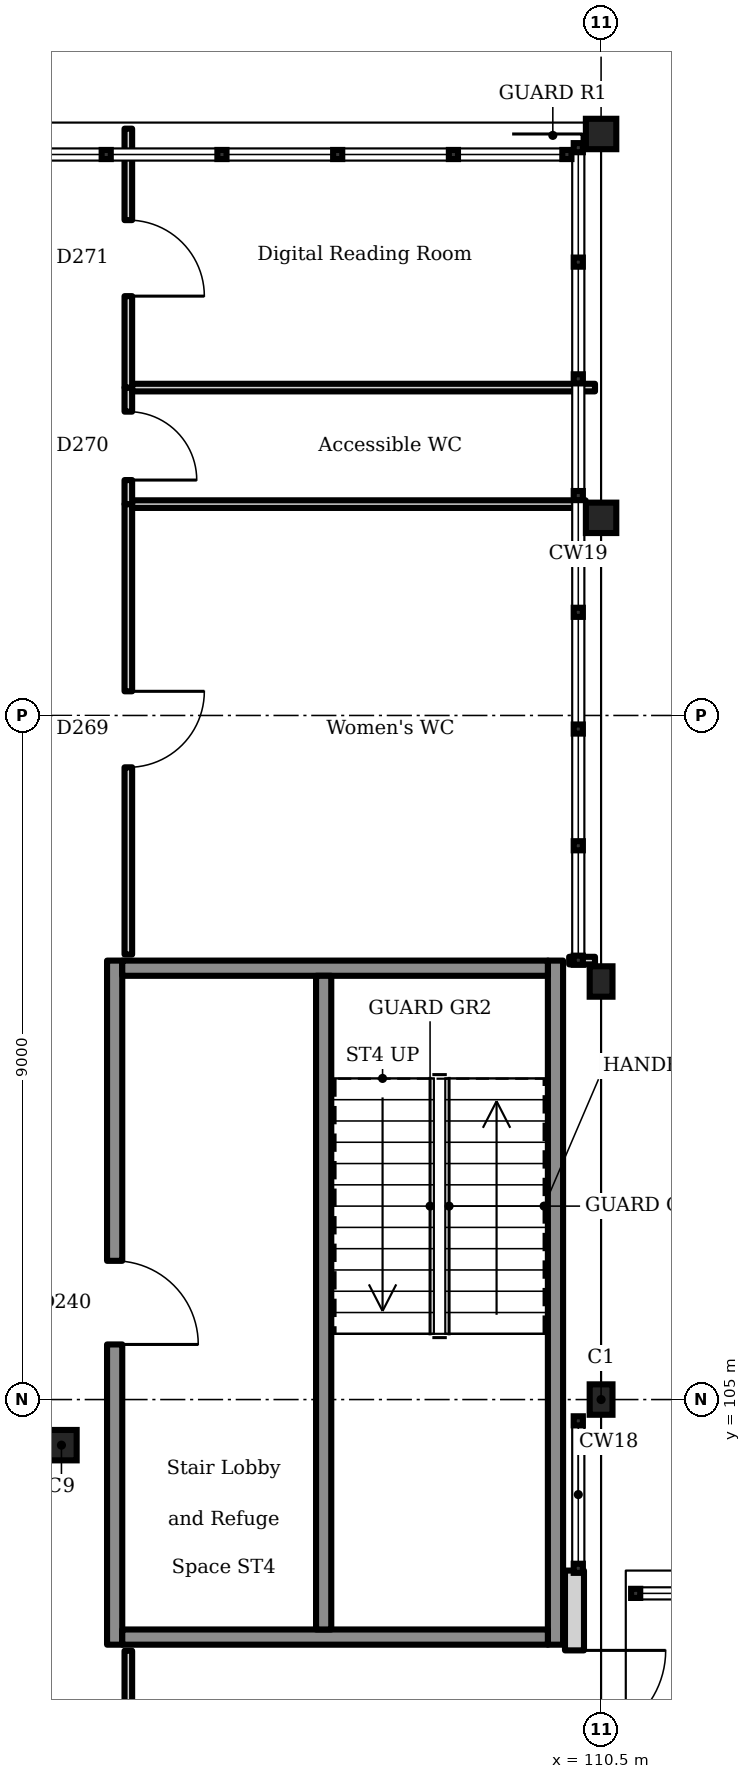
"""IFC4 building model, lengths in metres.
Left out: names, types, materials, properties, quantities, classifications, styles, units other than length and angle.
Written with IfcOpenShell. Run it as: python <this file> out.ifc"""

import sys

from ifc_helpers import new_model, si_unit, direction, frame, frame_2d, origin, origin_2d, place, context, subcontext, project, spatial, rectangle, hollow_circle, i_section, extrude, element, fill, save


model = new_model("IFC4")
c1 = context("Model", 3, precision=1e-05, world=origin(), true_north=direction((0.0, 1.0)))
c2 = subcontext(c1, "Body", "Model", "MODEL_VIEW")
j1 = project(units=[si_unit("LENGTHUNIT", "METRE"), si_unit("PLANEANGLEUNIT", "RADIAN")], contexts=[c1])
p1 = place(None, origin())
s1 = spatial("IfcSite", under=j1, at=p1, CompositionType="ELEMENT")
p2 = place(p1, origin())
s2 = spatial("IfcBuilding", under=s1, at=p2, CompositionType="ELEMENT")
p3 = place(p2, frame((0.0, 0.0, 9.9)))
s3 = spatial("IfcBuildingStorey", under=s2, at=p3, CompositionType="ELEMENT", Elevation=9.9)
for number, where, z_axis, x_axis in (
    (1, (110.5, 105.0, 0.0), (0.0, 0.0, 1.0), (1.0, 0.0, 0.0)),
    (2, (110.5, 110.5, 0.0), (0.0, 0.0, 1.0), (1.0, 0.0, 0.0)),
):
    element("IfcColumn", number, at=place(p3, frame(where, z_axis=z_axis, x_axis=x_axis)), inside=s3, PredefinedType="COLUMN", context=c2, shape_type="SweptSolid", body=[
        extrude(i_section(OverallWidth=0.3, OverallDepth=0.4, WebThickness=0.013, FlangeThickness=0.024, FilletRadius=0.027, at=origin_2d()), origin(), (0.0, 0.0, 1.0), 4.5),
    ])
p4 = place(p3, frame((103.4, 104.4, 0.0), z_axis=(0.0, 0.0, 1.0), x_axis=(1.0, 0.0, 0.0)))
e3 = element("IfcColumn", 3, at=p4, inside=s3, PredefinedType="COLUMN", context=c2, shape_type="SweptSolid", body=[
    extrude(hollow_circle(Radius=0.254, WallThickness=0.016, at=origin_2d()), origin(), (0.0, 0.0, 1.0), 4.5),
])
for number, where, z_axis, x_axis in (
    (4, (110.5, 121.65, 0.0), (0.0, 0.0, 1.0), (1.0, 0.0, 0.0)),
    (5, (110.5, 116.6, 0.0), (0.0, 0.0, 1.0), (1.0, 0.0, 0.0)),
):
    element("IfcColumn", number, at=place(p3, frame(where, z_axis=z_axis, x_axis=x_axis)), inside=s3, PredefinedType="COLUMN", context=c2, shape_type="SweptSolid", body=[
        extrude(hollow_circle(Radius=0.203, WallThickness=0.016, at=origin_2d()), origin(), (0.0, 0.0, 1.0), 4.5),
    ])
p5 = place(p3, frame((110.15, 98.25, 0.0), z_axis=(0.0, 0.0, 1.0), x_axis=(0.0, 1.0, 0.0)))
e6 = element("IfcWall", 6, at=p5, inside=s3, PredefinedType="SOLIDWALL", context=c2, shape_type="SweptSolid", body=[
    extrude(rectangle(XDim=4.5, YDim=0.25, at=frame_2d((2.25, 0.0))), origin(), (0.0, 0.0, 1.0), 4.35),
])
p6 = place(p5, frame((1.05, 0.0, 0.0)))
e7 = element("IfcOpeningElement", 7, at=p6, cuts=e6, PredefinedType="OPENING", context=c2, shape_type="SweptSolid", body=[
    extrude(rectangle(XDim=2.4, YDim=2.4, at=frame_2d((1.2, 1.2))), frame((0.0, 0.135, 0.0), z_axis=(0.0, -1.0, 0.0), x_axis=(1.0, 0.0, 0.0)), (0.0, 0.0, 1.0), 0.27),
])
p7 = place(p3, frame((104.1, 101.775, 0.0), z_axis=(0.0, 0.0, 1.0), x_axis=(0.0, 1.0, 0.0)))
e8 = element("IfcWall", 8, at=p7, inside=s3, PredefinedType="SOLIDWALL", context=c2, shape_type="SweptSolid", body=[
    extrude(rectangle(XDim=9.0, YDim=0.2, at=frame_2d((4.5, 0.0))), origin(), (0.0, 0.0, 1.0), 4.35),
])
p8 = place(p7, frame((3.95, 0.0, 0.0)))
e9 = element("IfcOpeningElement", 9, at=p8, cuts=e8, PredefinedType="OPENING", context=c2, shape_type="SweptSolid", body=[
    extrude(rectangle(XDim=1.1, YDim=2.1, at=frame_2d((0.55, 1.05))), frame((0.0, 0.11, 0.0), z_axis=(0.0, -1.0, 0.0), x_axis=(1.0, 0.0, 0.0)), (0.0, 0.0, 1.0), 0.22),
])
p9 = place(p3, frame((109.9, 101.775, 0.0), z_axis=(0.0, 0.0, 1.0), x_axis=(0.0, 1.0, 0.0)))
e10 = element("IfcWall", 10, at=p9, inside=s3, PredefinedType="SOLIDWALL", context=c2, shape_type="SweptSolid", body=[
    extrude(rectangle(XDim=9.0, YDim=0.2, at=frame_2d((4.5, 0.0))), origin(), (0.0, 0.0, 1.0), 4.35),
])
for number, where, z_axis, x_axis in (
    (11, (104.2, 101.875, 0.0), (0.0, 0.0, 1.0), (1.0, 0.0, 0.0)),
    (12, (104.2, 110.675, 0.0), (0.0, 0.0, 1.0), (1.0, 0.0, 0.0)),
):
    element("IfcWall", number, at=place(p3, frame(where, z_axis=z_axis, x_axis=x_axis)), inside=s3, PredefinedType="SOLIDWALL", context=c2, shape_type="SweptSolid", body=[
        extrude(rectangle(XDim=5.6, YDim=0.2, at=frame_2d((2.8, 0.0))), origin(), (0.0, 0.0, 1.0), 4.35),
    ])
p10 = place(p3, frame((106.85, 101.975, 0.0), z_axis=(0.0, 0.0, 1.0), x_axis=(0.0, 1.0, 0.0)))
e13 = element("IfcWall", 13, at=p10, inside=s3, PredefinedType="SOLIDWALL", context=c2, shape_type="SweptSolid", body=[
    extrude(rectangle(XDim=8.6, YDim=0.2, at=frame_2d((4.3, 0.0))), origin(), (0.0, 0.0, 1.0), 4.35),
])
p11 = place(p3, frame((104.28, 96.08, 0.0), z_axis=(0.0, 0.0, 1.0), x_axis=(0.0, 1.0, 0.0)))
e14 = element("IfcWall", 14, at=p11, inside=s3, PredefinedType="PARTITIONING", context=c2, shape_type="SweptSolid", body=[
    extrude(rectangle(XDim=5.615, YDim=0.1, at=frame_2d((2.808, 0.0))), origin(), (0.0, 0.0, 1.0), 4.35),
])
p12 = place(p11, frame((1.907, 0.0, 0.0)))
e15 = element("IfcOpeningElement", 15, at=p12, cuts=e14, PredefinedType="OPENING", context=c2, shape_type="SweptSolid", body=[
    extrude(rectangle(XDim=1.8, YDim=2.1, at=frame_2d((0.9, 1.05))), frame((0.0, 0.06, 0.0), z_axis=(0.0, -1.0, 0.0), x_axis=(1.0, 0.0, 0.0)), (0.0, 0.0, 1.0), 0.12),
])
p13 = place(p3, frame((110.42, 110.775, 0.0), z_axis=(0.0, 0.0, 1.0), x_axis=(-1.0, 0.0, 0.0)))
e16 = element("IfcWall", 16, at=p13, inside=s3, PredefinedType="PARTITIONING", context=c2, shape_type="SweptSolid", body=[
    extrude(rectangle(XDim=0.34, YDim=0.1, at=frame_2d((0.17, 0.0))), origin(), (0.0, 0.0, 1.0), 4.04),
])
p14 = place(p3, frame((104.28, 110.855, 0.0), z_axis=(0.0, 0.0, 1.0), x_axis=(0.0, 1.0, 0.0)))
e17 = element("IfcWall", 17, at=p14, inside=s3, PredefinedType="PARTITIONING", context=c2, shape_type="SweptSolid", body=[
    extrude(rectangle(XDim=5.926, YDim=0.1, at=frame_2d((2.963, 0.0))), origin(), (0.0, 0.0, 1.0), 4.35),
])
p15 = place(p14, frame((2.463, 0.0, 0.0)))
e18 = element("IfcOpeningElement", 18, at=p15, cuts=e17, PredefinedType="OPENING", context=c2, shape_type="SweptSolid", body=[
    extrude(rectangle(XDim=1.0, YDim=2.1, at=frame_2d((0.5, 1.05))), frame((0.0, 0.06, 0.0), z_axis=(0.0, -1.0, 0.0), x_axis=(1.0, 0.0, 0.0)), (0.0, 0.0, 1.0), 0.12),
])
p16 = place(p3, frame((104.33, 116.781, 0.0), z_axis=(0.0, 0.0, 1.0), x_axis=(1.0, 0.0, 0.0)))
e19 = element("IfcWall", 19, at=p16, inside=s3, PredefinedType="PARTITIONING", context=c2, shape_type="SweptSolid", body=[
    extrude(rectangle(XDim=5.967, YDim=0.1, at=frame_2d((2.983, 0.0))), origin(), (0.0, 0.0, 1.0), 3.85),
])
p17 = place(p3, frame((104.28, 116.781, 0.0), z_axis=(0.0, 0.0, 1.0), x_axis=(0.0, 1.0, 0.0)))
e20 = element("IfcWall", 20, at=p17, inside=s3, PredefinedType="PARTITIONING", context=c2, shape_type="SweptSolid", body=[
    extrude(rectangle(XDim=1.533, YDim=0.1, at=frame_2d((0.767, 0.0))), origin(), (0.0, 0.0, 1.0), 4.35),
])
p18 = place(p17, frame((0.317, 0.0, 0.0)))
e21 = element("IfcOpeningElement", 21, at=p18, cuts=e20, PredefinedType="OPENING", context=c2, shape_type="SweptSolid", body=[
    extrude(rectangle(XDim=0.9, YDim=2.1, at=frame_2d((0.45, 1.05))), frame((0.0, 0.06, 0.0), z_axis=(0.0, -1.0, 0.0), x_axis=(1.0, 0.0, 0.0)), (0.0, 0.0, 1.0), 0.12),
])
p19 = place(p3, frame((104.33, 118.314, 0.0), z_axis=(0.0, 0.0, 1.0), x_axis=(1.0, 0.0, 0.0)))
e22 = element("IfcWall", 22, at=p19, inside=s3, PredefinedType="PARTITIONING", context=c2, shape_type="SweptSolid", body=[
    extrude(rectangle(XDim=6.09, YDim=0.1, at=frame_2d((3.045, 0.0))), origin(), (0.0, 0.0, 1.0), 3.85),
])
p20 = place(p3, frame((104.28, 118.314, 0.0), z_axis=(0.0, 0.0, 1.0), x_axis=(0.0, 1.0, 0.0)))
e23 = element("IfcWall", 23, at=p20, inside=s3, PredefinedType="PARTITIONING", context=c2, shape_type="SweptSolid", body=[
    extrude(rectangle(XDim=3.406, YDim=0.1, at=frame_2d((1.703, 0.0))), origin(), (0.0, 0.0, 1.0), 3.95),
])
p21 = place(p20, frame((1.203, 0.0, 0.0)))
e24 = element("IfcOpeningElement", 24, at=p21, cuts=e23, PredefinedType="OPENING", context=c2, shape_type="SweptSolid", body=[
    extrude(rectangle(XDim=1.0, YDim=2.1, at=frame_2d((0.5, 1.05))), frame((0.0, 0.06, 0.0), z_axis=(0.0, -1.0, 0.0), x_axis=(1.0, 0.0, 0.0)), (0.0, 0.0, 1.0), 0.12),
])
p22 = place(p6, frame((2.4, 0.0, 0.0), z_axis=(0.0, 0.0, 1.0), x_axis=(-1.0, 0.0, 0.0)))
e25 = element("IfcDoor", 25, at=p22, inside=s3, OperationType="DOUBLE_DOOR_SINGLE_SWING", PredefinedType="DOOR", context=c2, shape_type="SweptSolid", body=[
    extrude(rectangle(XDim=2.4, YDim=2.4, at=frame_2d((1.2, 1.2))), frame((0.0, 0.025, 0.0), z_axis=(0.0, -1.0, 0.0), x_axis=(1.0, 0.0, 0.0)), (0.0, 0.0, 1.0), 0.05),
])
fill(e7, e25)
p23 = place(p8, frame((1.1, 0.0, 0.0), z_axis=(0.0, 0.0, 1.0), x_axis=(-1.0, 0.0, 0.0)))
e26 = element("IfcDoor", 26, at=p23, inside=s3, OperationType="SINGLE_SWING_LEFT", PredefinedType="DOOR", context=c2, shape_type="SweptSolid", body=[
    extrude(rectangle(XDim=1.1, YDim=2.1, at=frame_2d((0.55, 1.05))), frame((0.0, 0.025, 0.0), z_axis=(0.0, -1.0, 0.0), x_axis=(1.0, 0.0, 0.0)), (0.0, 0.0, 1.0), 0.05),
])
fill(e9, e26)
p24 = place(p15, frame((1.0, 0.0, 0.0), z_axis=(0.0, 0.0, 1.0), x_axis=(-1.0, 0.0, 0.0)))
e27 = element("IfcDoor", 27, at=p24, inside=s3, OperationType="SINGLE_SWING_RIGHT", PredefinedType="DOOR", context=c2, shape_type="SweptSolid", body=[
    extrude(rectangle(XDim=1.0, YDim=2.1, at=frame_2d((0.5, 1.05))), frame((0.0, 0.025, 0.0), z_axis=(0.0, -1.0, 0.0), x_axis=(1.0, 0.0, 0.0)), (0.0, 0.0, 1.0), 0.05),
])
fill(e18, e27)
p25 = place(p18, frame((0.9, 0.0, 0.0), z_axis=(0.0, 0.0, 1.0), x_axis=(-1.0, 0.0, 0.0)))
e28 = element("IfcDoor", 28, at=p25, inside=s3, OperationType="SINGLE_SWING_LEFT", PredefinedType="DOOR", context=c2, shape_type="SweptSolid", body=[
    extrude(rectangle(XDim=0.9, YDim=2.1, at=frame_2d((0.45, 1.05))), frame((0.0, 0.025, 0.0), z_axis=(0.0, -1.0, 0.0), x_axis=(1.0, 0.0, 0.0)), (0.0, 0.0, 1.0), 0.05),
])
fill(e21, e28)
p26 = place(p21, frame((1.0, 0.0, 0.0), z_axis=(0.0, 0.0, 1.0), x_axis=(-1.0, 0.0, 0.0)))
e29 = element("IfcDoor", 29, at=p26, inside=s3, OperationType="SINGLE_SWING_LEFT", PredefinedType="DOOR", context=c2, shape_type="SweptSolid", body=[
    extrude(rectangle(XDim=1.0, YDim=2.1, at=frame_2d((0.5, 1.05))), frame((0.0, 0.025, 0.0), z_axis=(0.0, -1.0, 0.0), x_axis=(1.0, 0.0, 0.0)), (0.0, 0.0, 1.0), 0.05),
])
fill(e24, e29)
save(model, sys.argv[1])
